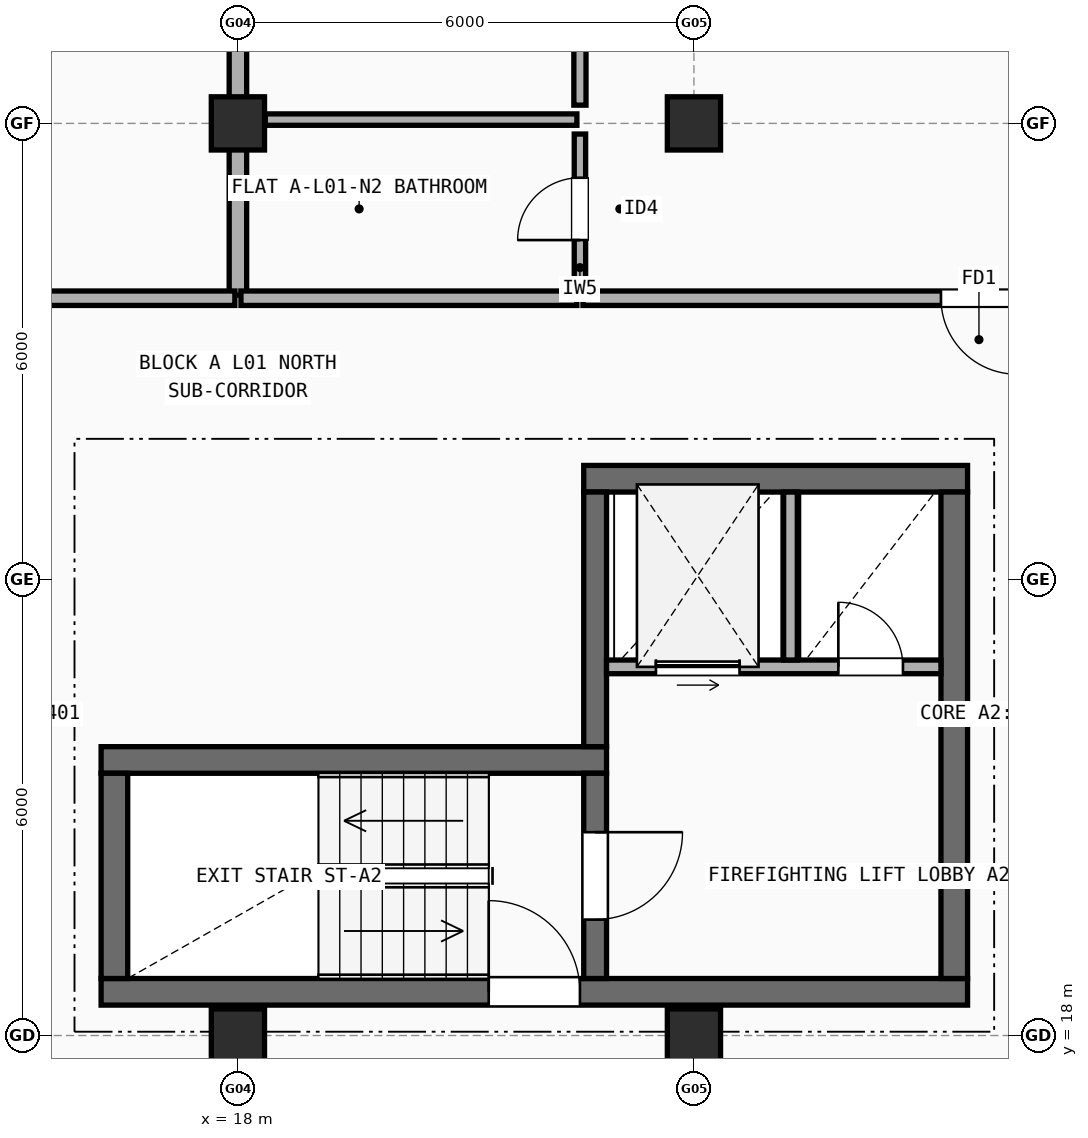
"""IFC4 building model, lengths in metres.
Left out: names, types, materials, properties, quantities, classifications, styles, units other than length and angle.
Written with IfcOpenShell. Run it as: python <this file> out.ifc"""

import sys

from ifc_helpers import new_model, si_unit, direction, frame, frame_2d, origin, origin_2d, place, context, subcontext, project, spatial, rectangle, extrude, element, fill, save


model = new_model("IFC4")
c1 = context("Model", 3, precision=1e-05, world=origin(), true_north=direction((0.0, 1.0)))
c2 = subcontext(c1, "Body", "Model", "MODEL_VIEW")
j1 = project(units=[si_unit("LENGTHUNIT", "METRE"), si_unit("PLANEANGLEUNIT", "RADIAN")], contexts=[c1])
p1 = place(None, origin())
s1 = spatial("IfcSite", under=j1, at=p1, CompositionType="ELEMENT")
p2 = place(p1, origin())
s2 = spatial("IfcBuilding", under=s1, at=p2, CompositionType="ELEMENT")
p3 = place(p2, frame((0.0, 0.0, 4.5)))
s3 = spatial("IfcBuildingStorey", under=s2, at=p3, CompositionType="ELEMENT", Elevation=4.5)
for number, where, z_axis, x_axis in (
    (1, (18.0, 18.0, 0.0), (0.0, 0.0, 1.0), (1.0, 0.0, 0.0)),
    (2, (18.0, 30.0, 0.0), (0.0, 0.0, 1.0), (1.0, 0.0, 0.0)),
    (3, (24.0, 18.0, 0.0), (0.0, 0.0, 1.0), (1.0, 0.0, 0.0)),
    (4, (24.0, 30.0, 0.0), (0.0, 0.0, 1.0), (1.0, 0.0, 0.0)),
):
    element("IfcColumn", number, at=place(p3, frame(where, z_axis=z_axis, x_axis=x_axis)), inside=s3, PredefinedType="COLUMN", context=c2, shape_type="SweptSolid", body=[
        extrude(rectangle(XDim=0.7, YDim=0.7, at=origin_2d()), origin(), (0.0, 0.0, 1.0), 2.945),
    ])
p4 = place(p3, frame((16.2, 18.575, 0.0), z_axis=(0.0, 0.0, 1.0), x_axis=(1.0, 0.0, 0.0)))
e5 = element("IfcWall", 5, at=p4, inside=s3, PredefinedType="SHEAR", context=c2, shape_type="SweptSolid", body=[
    extrude(rectangle(XDim=11.4, YDim=0.35, at=frame_2d((5.7, 0.0))), origin(), (0.0, 0.0, 1.0), 2.945),
])
p5 = place(p4, frame((5.1, 0.0, 0.0)))
e6 = element("IfcOpeningElement", 6, at=p5, cuts=e5, PredefinedType="OPENING", context=c2, shape_type="SweptSolid", body=[
    extrude(rectangle(XDim=1.2, YDim=2.15, at=frame_2d((0.6, 1.075))), frame((0.0, 0.185, 0.0), z_axis=(0.0, -1.0, 0.0), x_axis=(1.0, 0.0, 0.0)), (0.0, 0.0, 1.0), 0.37),
])
p6 = place(p3, frame((22.85, 21.625, 0.0), z_axis=(0.0, 0.0, 1.0), x_axis=(-1.0, 0.0, 0.0)))
e7 = element("IfcWall", 7, at=p6, inside=s3, PredefinedType="SHEAR", context=c2, shape_type="SweptSolid", body=[
    extrude(rectangle(XDim=6.65, YDim=0.35, at=frame_2d((3.325, 0.0))), origin(), (0.0, 0.0, 1.0), 2.945),
])
p7 = place(p3, frame((16.375, 21.45, 0.0), z_axis=(0.0, 0.0, 1.0), x_axis=(0.0, -1.0, 0.0)))
e8 = element("IfcWall", 8, at=p7, inside=s3, PredefinedType="SHEAR", context=c2, shape_type="SweptSolid", body=[
    extrude(rectangle(XDim=2.7, YDim=0.35, at=frame_2d((1.35, 0.0))), origin(), (0.0, 0.0, 1.0), 2.945),
])
p8 = place(p3, frame((22.7, 18.75, 0.0), z_axis=(0.0, 0.0, 1.0), x_axis=(0.0, 1.0, 0.0)))
e9 = element("IfcWall", 9, at=p8, inside=s3, PredefinedType="SHEAR", context=c2, shape_type="SweptSolid", body=[
    extrude(rectangle(XDim=2.7, YDim=0.3, at=frame_2d((1.35, 0.0))), origin(), (0.0, 0.0, 1.0), 2.945),
])
p9 = place(p8, frame((0.775, 0.0, 0.0)))
e10 = element("IfcOpeningElement", 10, at=p9, cuts=e9, PredefinedType="OPENING", context=c2, shape_type="SweptSolid", body=[
    extrude(rectangle(XDim=1.15, YDim=2.15, at=frame_2d((0.575, 1.075))), frame((0.0, 0.16, 0.0), z_axis=(0.0, -1.0, 0.0), x_axis=(1.0, 0.0, 0.0)), (0.0, 0.0, 1.0), 0.32),
])
p10 = place(p3, frame((27.6, 25.325, 0.0), z_axis=(0.0, 0.0, 1.0), x_axis=(-1.0, 0.0, 0.0)))
e11 = element("IfcWall", 11, at=p10, inside=s3, PredefinedType="SHEAR", context=c2, shape_type="SweptSolid", body=[
    extrude(rectangle(XDim=5.05, YDim=0.35, at=frame_2d((2.525, 0.0))), origin(), (0.0, 0.0, 1.0), 2.945),
])
p11 = place(p3, frame((27.425, 18.75, 0.0), z_axis=(0.0, 0.0, 1.0), x_axis=(0.0, 1.0, 0.0)))
e12 = element("IfcWall", 12, at=p11, inside=s3, PredefinedType="SHEAR", context=c2, shape_type="SweptSolid", body=[
    extrude(rectangle(XDim=6.4, YDim=0.35, at=frame_2d((3.2, 0.0))), origin(), (0.0, 0.0, 1.0), 2.945),
])
p12 = place(p3, frame((22.7, 21.8, 0.0), z_axis=(0.0, 0.0, 1.0), x_axis=(0.0, 1.0, 0.0)))
e13 = element("IfcWall", 13, at=p12, inside=s3, PredefinedType="SHEAR", context=c2, shape_type="SweptSolid", body=[
    extrude(rectangle(XDim=3.35, YDim=0.3, at=frame_2d((1.675, 0.0))), origin(), (0.0, 0.0, 1.0), 2.945),
])
p13 = place(p3, frame((22.85, 22.85, 0.0), z_axis=(0.0, 0.0, 1.0), x_axis=(1.0, 0.0, 0.0)))
e14 = element("IfcWall", 14, at=p13, inside=s3, PredefinedType="SOLIDWALL", context=c2, shape_type="SweptSolid", body=[
    extrude(rectangle(XDim=4.4, YDim=0.18, at=frame_2d((2.2, 0.0))), origin(), (0.0, 0.0, 1.0), 2.945),
])
p14 = place(p13, frame((0.65, 0.0, 0.0)))
e15 = element("IfcOpeningElement", 15, at=p14, cuts=e14, PredefinedType="OPENING", context=c2, shape_type="SweptSolid", body=[
    extrude(rectangle(XDim=1.1, YDim=2.15, at=frame_2d((0.55, 1.075))), frame((0.0, 0.1, 0.0), z_axis=(0.0, -1.0, 0.0), x_axis=(1.0, 0.0, 0.0)), (0.0, 0.0, 1.0), 0.2),
])
p15 = place(p13, frame((3.05, 0.0, 0.0)))
e16 = element("IfcOpeningElement", 16, at=p15, cuts=e14, PredefinedType="OPENING", context=c2, shape_type="SweptSolid", body=[
    extrude(rectangle(XDim=0.85, YDim=2.1, at=frame_2d((0.425, 1.05))), frame((0.0, 0.1, 0.0), z_axis=(0.0, -1.0, 0.0), x_axis=(1.0, 0.0, 0.0)), (0.0, 0.0, 1.0), 0.2),
])
p16 = place(p3, frame((25.27, 22.94, 0.0), z_axis=(0.0, 0.0, 1.0), x_axis=(0.0, 1.0, 0.0)))
e17 = element("IfcWall", 17, at=p16, inside=s3, PredefinedType="SOLIDWALL", context=c2, shape_type="SweptSolid", body=[
    extrude(rectangle(XDim=2.21, YDim=0.18, at=frame_2d((1.105, 0.0))), origin(), (0.0, 0.0, 1.0), 2.945),
])
p17 = place(p3, frame((18.0, 27.74, 0.0), z_axis=(0.0, 0.0, 1.0), x_axis=(0.0, 1.0, 0.0)))
e18 = element("IfcWall", 18, at=p17, inside=s3, PredefinedType="SOLIDWALL", context=c2, shape_type="SweptSolid", body=[
    extrude(rectangle(XDim=13.87, YDim=0.23, at=frame_2d((6.935, 0.0))), origin(), (0.0, 0.0, 1.0), 2.327),
])
p18 = place(p3, frame((15.04, 27.7, 0.0), z_axis=(0.0, 0.0, 1.0), x_axis=(1.0, 0.0, 0.0)))
e19 = element("IfcWall", 19, at=p18, inside=s3, PredefinedType="SOLIDWALL", context=c2, shape_type="SweptSolid", body=[
    extrude(rectangle(XDim=2.92, YDim=0.19, at=frame_2d((1.46, 0.0))), origin(), (0.0, 0.0, 1.0), 2.945),
])
p19 = place(p3, frame((18.04, 27.7, 0.0), z_axis=(0.0, 0.0, 1.0), x_axis=(1.0, 0.0, 0.0)))
e20 = element("IfcWall", 20, at=p19, inside=s3, PredefinedType="SOLIDWALL", context=c2, shape_type="SweptSolid", body=[
    extrude(rectangle(XDim=4.42, YDim=0.19, at=frame_2d((2.21, 0.0))), origin(), (0.0, 0.0, 1.0), 2.945),
])
p20 = place(p3, frame((22.54, 27.7, 0.0), z_axis=(0.0, 0.0, 1.0), x_axis=(1.0, 0.0, 0.0)))
e21 = element("IfcWall", 21, at=p20, inside=s3, PredefinedType="SOLIDWALL", context=c2, shape_type="SweptSolid", body=[
    extrude(rectangle(XDim=10.42, YDim=0.19, at=frame_2d((5.21, 0.0))), origin(), (0.0, 0.0, 1.0), 2.427),
])
p21 = place(p20, frame((4.71, 0.0, 0.0)))
e22 = element("IfcOpeningElement", 22, at=p21, cuts=e21, PredefinedType="OPENING", context=c2, shape_type="SweptSolid", body=[
    extrude(rectangle(XDim=1.0, YDim=2.15, at=frame_2d((0.5, 1.075))), frame((0.0, 0.105, 0.0), z_axis=(0.0, -1.0, 0.0), x_axis=(1.0, 0.0, 0.0)), (0.0, 0.0, 1.0), 0.21),
])
p22 = place(p3, frame((22.5, 30.24, 0.0), z_axis=(0.0, 0.0, 1.0), x_axis=(0.0, 1.0, 0.0)))
e23 = element("IfcWall", 23, at=p22, inside=s3, PredefinedType="PLUMBINGWALL", context=c2, shape_type="SweptSolid", body=[
    extrude(rectangle(XDim=7.37, YDim=0.16, at=frame_2d((3.685, 0.0))), origin(), (0.0, 0.0, 1.0), 2.427),
])
p23 = place(p22, frame((3.235, 0.0, 0.0)))
e24 = element("IfcOpeningElement", 24, at=p23, cuts=e23, PredefinedType="OPENING", context=c2, shape_type="SweptSolid", body=[
    extrude(rectangle(XDim=0.9, YDim=2.1, at=frame_2d((0.45, 1.05))), frame((0.0, 0.09, 0.0), z_axis=(0.0, -1.0, 0.0), x_axis=(1.0, 0.0, 0.0)), (0.0, 0.0, 1.0), 0.18),
])
p24 = place(p3, frame((22.5, 27.89, 0.0), z_axis=(0.0, 0.0, 1.0), x_axis=(0.0, 1.0, 0.0)))
e25 = element("IfcWall", 25, at=p24, inside=s3, PredefinedType="PARTITIONING", context=c2, shape_type="SweptSolid", body=[
    extrude(rectangle(XDim=1.97, YDim=0.15, at=frame_2d((0.985, 0.0))), origin(), (0.0, 0.0, 1.0), 2.945),
])
p25 = place(p24, frame((0.575, 0.0, 0.0)))
e26 = element("IfcOpeningElement", 26, at=p25, cuts=e25, PredefinedType="OPENING", context=c2, shape_type="SweptSolid", body=[
    extrude(rectangle(XDim=0.82, YDim=2.08, at=frame_2d((0.41, 1.04))), frame((0.0, 0.085, 0.0), z_axis=(0.0, -1.0, 0.0), x_axis=(1.0, 0.0, 0.0)), (0.0, 0.0, 1.0), 0.17),
])
p26 = place(p3, frame((18.36, 30.05, 0.0), z_axis=(0.0, 0.0, 1.0), x_axis=(1.0, 0.0, 0.0)))
e27 = element("IfcWall", 27, at=p26, inside=s3, PredefinedType="PARTITIONING", context=c2, shape_type="SweptSolid", body=[
    extrude(rectangle(XDim=4.1, YDim=0.15, at=frame_2d((2.05, 0.0))), origin(), (0.0, 0.0, 1.0), 2.427),
])
p27 = place(p5, origin())
e28 = element("IfcDoor", 28, at=p27, inside=s3, OperationType="SINGLE_SWING_LEFT", PredefinedType="DOOR", context=c2, shape_type="SweptSolid", body=[
    extrude(rectangle(XDim=1.2, YDim=2.15, at=frame_2d((0.6, 1.075))), frame((0.0, 0.025, 0.0), z_axis=(0.0, -1.0, 0.0), x_axis=(1.0, 0.0, 0.0)), (0.0, 0.0, 1.0), 0.05),
])
fill(e6, e28)
p28 = place(p9, origin())
e29 = element("IfcDoor", 29, at=p28, inside=s3, OperationType="SINGLE_SWING_RIGHT", PredefinedType="DOOR", context=c2, shape_type="SweptSolid", body=[
    extrude(rectangle(XDim=1.15, YDim=2.15, at=frame_2d((0.575, 1.075))), frame((0.0, 0.025, 0.0), z_axis=(0.0, -1.0, 0.0), x_axis=(1.0, 0.0, 0.0)), (0.0, 0.0, 1.0), 0.05),
])
fill(e10, e29)
p29 = place(p14, origin())
e30 = element("IfcDoor", 30, at=p29, inside=s3, OperationType="SLIDING_TO_LEFT", PredefinedType="DOOR", context=c2, shape_type="SweptSolid", body=[
    extrude(rectangle(XDim=1.1, YDim=2.15, at=frame_2d((0.55, 1.075))), frame((0.0, 0.025, 0.0), z_axis=(0.0, -1.0, 0.0), x_axis=(1.0, 0.0, 0.0)), (0.0, 0.0, 1.0), 0.05),
])
fill(e15, e30)
p30 = place(p15, frame((0.85, 0.0, 0.0), z_axis=(0.0, 0.0, 1.0), x_axis=(-1.0, 0.0, 0.0)))
e31 = element("IfcDoor", 31, at=p30, inside=s3, OperationType="SINGLE_SWING_LEFT", PredefinedType="DOOR", context=c2, shape_type="SweptSolid", body=[
    extrude(rectangle(XDim=0.85, YDim=2.1, at=frame_2d((0.425, 1.05))), frame((0.0, 0.025, 0.0), z_axis=(0.0, -1.0, 0.0), x_axis=(1.0, 0.0, 0.0)), (0.0, 0.0, 1.0), 0.05),
])
fill(e16, e31)
p31 = place(p21, origin())
e32 = element("IfcDoor", 32, at=p31, inside=s3, OperationType="SINGLE_SWING_RIGHT", PredefinedType="DOOR", context=c2, shape_type="SweptSolid", body=[
    extrude(rectangle(XDim=1.0, YDim=2.15, at=frame_2d((0.5, 1.075))), frame((0.0, 0.025, 0.0), z_axis=(0.0, -1.0, 0.0), x_axis=(1.0, 0.0, 0.0)), (0.0, 0.0, 1.0), 0.05),
])
fill(e22, e32)
p32 = place(p25, origin())
e33 = element("IfcDoor", 33, at=p32, inside=s3, OperationType="SINGLE_SWING_LEFT", PredefinedType="DOOR", context=c2, shape_type="SweptSolid", body=[
    extrude(rectangle(XDim=0.82, YDim=2.08, at=frame_2d((0.41, 1.04))), frame((0.0, 0.025, 0.0), z_axis=(0.0, -1.0, 0.0), x_axis=(1.0, 0.0, 0.0)), (0.0, 0.0, 1.0), 0.05),
])
fill(e26, e33)
save(model, sys.argv[1])
